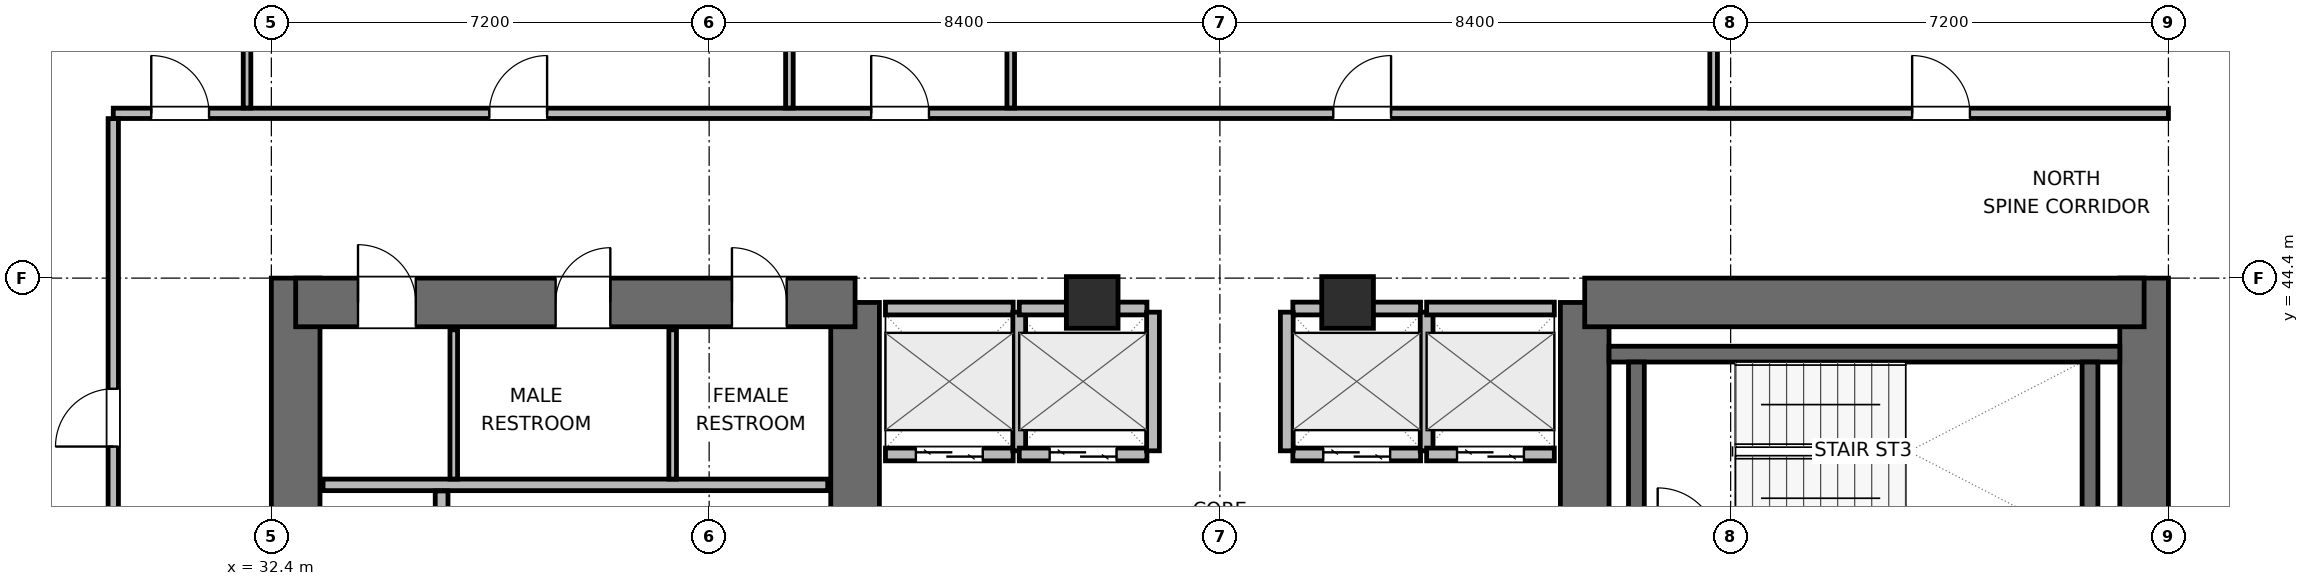
"""IFC4 building model, lengths in metres.
Left out: names, types, materials, properties, quantities, classifications, styles, units other than length and angle.
Written with IfcOpenShell. Run it as: python <this file> out.ifc"""

import sys

from ifc_helpers import new_model, si_unit, direction, frame, frame_2d, origin, origin_2d, place, context, subcontext, project, spatial, rectangle, extrude, element, fill, save


model = new_model("IFC4")
c1 = context("Model", 3, precision=1e-05, world=origin(), true_north=direction((0.0, 1.0)))
c2 = subcontext(c1, "Body", "Model", "MODEL_VIEW")
j1 = project(units=[si_unit("LENGTHUNIT", "METRE"), si_unit("PLANEANGLEUNIT", "RADIAN")], contexts=[c1])
p1 = place(None, origin())
s1 = spatial("IfcSite", under=j1, at=p1, CompositionType="ELEMENT")
p2 = place(p1, origin())
s2 = spatial("IfcBuilding", under=s1, at=p2, CompositionType="ELEMENT")
p3 = place(p2, frame((0.0, 0.0, 170.1)))
s3 = spatial("IfcBuildingStorey", under=s2, at=p3, CompositionType="ELEMENT", Elevation=170.1)
p4 = place(p3, frame((32.8, 27.6, 0.0), z_axis=(0.0, 0.0, 1.0), x_axis=(0.0, 1.0, 0.0)))
e1 = element("IfcWall", 1, at=p4, inside=s3, PredefinedType="SHEAR", context=c2, shape_type="SweptSolid", body=[
    extrude(rectangle(XDim=16.8, YDim=0.8, at=frame_2d((8.4, 0.0))), origin(), (0.0, 0.0, 1.0), 3.9),
])
p5 = place(p3, frame((42.0, 37.8, 0.0), z_axis=(0.0, 0.0, 1.0), x_axis=(0.0, 1.0, 0.0)))
e2 = element("IfcWall", 2, at=p5, inside=s3, PredefinedType="SHEAR", context=c2, shape_type="SweptSolid", body=[
    extrude(rectangle(XDim=6.2, YDim=0.8, at=frame_2d((3.1, 0.0))), origin(), (0.0, 0.0, 1.0), 3.9),
])
p6 = place(p3, frame((32.8, 44.0, 0.0), z_axis=(0.0, 0.0, 1.0), x_axis=(1.0, 0.0, 0.0)))
e3 = element("IfcWall", 3, at=p6, inside=s3, PredefinedType="SHEAR", context=c2, shape_type="SweptSolid", body=[
    extrude(rectangle(XDim=9.2, YDim=0.8, at=frame_2d((4.6, 0.0))), origin(), (0.0, 0.0, 1.0), 3.9),
])
p7 = place(p6, frame((1.025, 0.0, 0.0)))
e4 = element("IfcOpeningElement", 4, at=p7, cuts=e3, PredefinedType="OPENING", context=c2, shape_type="SweptSolid", body=[
    extrude(rectangle(XDim=0.95, YDim=2.04, at=frame_2d((0.475, 1.02))), frame((0.0, 0.41, 0.0), z_axis=(0.0, -1.0, 0.0), x_axis=(1.0, 0.0, 0.0)), (0.0, 0.0, 1.0), 0.82),
])
p8 = place(p6, frame((4.275, 0.0, 0.0)))
e5 = element("IfcOpeningElement", 5, at=p8, cuts=e3, PredefinedType="OPENING", context=c2, shape_type="SweptSolid", body=[
    extrude(rectangle(XDim=0.9, YDim=2.02, at=frame_2d((0.45, 1.01))), frame((0.0, 0.41, 0.0), z_axis=(0.0, -1.0, 0.0), x_axis=(1.0, 0.0, 0.0)), (0.0, 0.0, 1.0), 0.82),
])
p9 = place(p6, frame((7.175, 0.0, 0.0)))
e6 = element("IfcOpeningElement", 6, at=p9, cuts=e3, PredefinedType="OPENING", context=c2, shape_type="SweptSolid", body=[
    extrude(rectangle(XDim=0.9, YDim=2.02, at=frame_2d((0.45, 1.01))), frame((0.0, 0.41, 0.0), z_axis=(0.0, -1.0, 0.0), x_axis=(1.0, 0.0, 0.0)), (0.0, 0.0, 1.0), 0.82),
])
p10 = place(p3, frame((54.0, 38.0, 0.0), z_axis=(0.0, 0.0, 1.0), x_axis=(0.0, 1.0, 0.0)))
e7 = element("IfcWall", 7, at=p10, inside=s3, PredefinedType="SHEAR", context=c2, shape_type="SweptSolid", body=[
    extrude(rectangle(XDim=6.0, YDim=0.8, at=frame_2d((3.0, 0.0))), origin(), (0.0, 0.0, 1.0), 3.9),
])
p11 = place(p3, frame((63.2, 27.6, 0.0), z_axis=(0.0, 0.0, 1.0), x_axis=(0.0, 1.0, 0.0)))
e8 = element("IfcWall", 8, at=p11, inside=s3, PredefinedType="SHEAR", context=c2, shape_type="SweptSolid", body=[
    extrude(rectangle(XDim=16.8, YDim=0.8, at=frame_2d((8.4, 0.0))), origin(), (0.0, 0.0, 1.0), 3.9),
])
p12 = place(p3, frame((54.0, 44.0, 0.0), z_axis=(0.0, 0.0, 1.0), x_axis=(1.0, 0.0, 0.0)))
e9 = element("IfcWall", 9, at=p12, inside=s3, PredefinedType="SHEAR", context=c2, shape_type="SweptSolid", body=[
    extrude(rectangle(XDim=9.2, YDim=0.8, at=frame_2d((4.6, 0.0))), origin(), (0.0, 0.0, 1.0), 3.9),
])
p13 = place(p3, frame((54.4, 43.15, 0.0), z_axis=(0.0, 0.0, 1.0), x_axis=(1.0, 0.0, 0.0)))
e10 = element("IfcWall", 10, at=p13, inside=s3, PredefinedType="SHEAR", context=c2, shape_type="SweptSolid", body=[
    extrude(rectangle(XDim=8.4, YDim=0.26, at=frame_2d((4.2, 0.0))), origin(), (0.0, 0.0, 1.0), 3.9),
])
for number, where, z_axis, x_axis in (
    (11, (54.85, 40.08, 0.0), (0.0, 0.0, 1.0), (0.0, 1.0, 0.0)),
    (12, (62.31, 40.08, 0.0), (0.0, 0.0, 1.0), (0.0, 1.0, 0.0)),
):
    element("IfcWall", number, at=place(p3, frame(where, z_axis=z_axis, x_axis=x_axis)), inside=s3, PredefinedType="SHEAR", context=c2, shape_type="SweptSolid", body=[
        extrude(rectangle(XDim=2.94, YDim=0.26, at=frame_2d((1.47, 0.0))), origin(), (0.0, 0.0, 1.0), 3.9),
    ])
for number, where, z_axis, x_axis in (
    (13, (45.9, 44.0, 0.0), (0.0, 0.0, 1.0), (1.0, 0.0, 0.0)),
    (14, (50.1, 44.0, 0.0), (0.0, 0.0, 1.0), (1.0, 0.0, 0.0)),
):
    element("IfcColumn", number, at=place(p3, frame(where, z_axis=z_axis, x_axis=x_axis)), inside=s3, PredefinedType="COLUMN", context=c2, shape_type="SweptSolid", body=[
        extrude(rectangle(XDim=0.85, YDim=0.85, at=origin_2d()), origin(), (0.0, 0.0, 1.0), 3.9),
    ])
p14 = place(p3, frame((33.25, 41.0, 0.0), z_axis=(0.0, 0.0, 1.0), x_axis=(1.0, 0.0, 0.0)))
e15 = element("IfcWall", 15, at=p14, inside=s3, PredefinedType="PLUMBINGWALL", context=c2, shape_type="SweptSolid", body=[
    extrude(rectangle(XDim=8.3, YDim=0.19, at=frame_2d((4.15, 0.0))), origin(), (0.0, 0.0, 1.0), 3.68),
])
for number, where, z_axis, x_axis in (
    (16, (35.4, 41.095, 0.0), (0.0, 0.0, 1.0), (0.0, 1.0, 0.0)),
    (17, (39.0, 41.095, 0.0), (0.0, 0.0, 1.0), (0.0, 1.0, 0.0)),
):
    element("IfcWall", number, at=place(p3, frame(where, z_axis=z_axis, x_axis=x_axis)), inside=s3, PredefinedType="PARTITIONING", context=c2, shape_type="SweptSolid", body=[
        extrude(rectangle(XDim=2.455, YDim=0.125, at=frame_2d((1.228, 0.0))), origin(), (0.0, 0.0, 1.0), 3.68),
    ])
p15 = place(p3, frame((35.2, 39.58, 0.0), z_axis=(0.0, 0.0, 1.0), x_axis=(0.0, 1.0, 0.0)))
e18 = element("IfcWall", 18, at=p15, inside=s3, PredefinedType="PARTITIONING", context=c2, shape_type="SweptSolid", body=[
    extrude(rectangle(XDim=1.32, YDim=0.21, at=frame_2d((0.66, 0.0))), origin(), (0.0, 0.0, 1.0), 3.68),
])
p16 = place(p3, frame((42.5, 41.5, 0.0), z_axis=(0.0, 0.0, 1.0), x_axis=(1.0, 0.0, 0.0)))
e19 = element("IfcWall", 19, at=p16, inside=s3, PredefinedType="PARTITIONING", context=c2, shape_type="SweptSolid", body=[
    extrude(rectangle(XDim=2.1, YDim=0.21, at=frame_2d((1.05, 0.0))), origin(), (0.0, 0.0, 1.0), 3.68),
])
p17 = place(p16, frame((0.5, 0.0, 0.0)))
e20 = element("IfcOpeningElement", 20, at=p17, cuts=e19, PredefinedType="OPENING", context=c2, shape_type="SweptSolid", body=[
    extrude(rectangle(XDim=1.1, YDim=2.04, at=frame_2d((0.55, 1.02))), frame((0.0, 0.115, 0.0), z_axis=(0.0, -1.0, 0.0), x_axis=(1.0, 0.0, 0.0)), (0.0, 0.0, 1.0), 0.23),
])
p18 = place(p3, frame((42.5, 43.9, 0.0), z_axis=(0.0, 0.0, 1.0), x_axis=(1.0, 0.0, 0.0)))
e21 = element("IfcWall", 21, at=p18, inside=s3, PredefinedType="PARTITIONING", context=c2, shape_type="SweptSolid", body=[
    extrude(rectangle(XDim=2.1, YDim=0.21, at=frame_2d((1.05, 0.0))), origin(), (0.0, 0.0, 1.0), 2.765),
])
p19 = place(p3, frame((44.7, 41.56, 0.0), z_axis=(0.0, 0.0, 1.0), x_axis=(0.0, 1.0, 0.0)))
e22 = element("IfcWall", 22, at=p19, inside=s3, PredefinedType="PARTITIONING", context=c2, shape_type="SweptSolid", body=[
    extrude(rectangle(XDim=2.28, YDim=0.21, at=frame_2d((1.14, 0.0))), origin(), (0.0, 0.0, 1.0), 3.68),
])
p20 = place(p3, frame((44.7, 41.5, 0.0), z_axis=(0.0, 0.0, 1.0), x_axis=(1.0, 0.0, 0.0)))
e23 = element("IfcWall", 23, at=p20, inside=s3, PredefinedType="PARTITIONING", context=c2, shape_type="SweptSolid", body=[
    extrude(rectangle(XDim=2.1, YDim=0.21, at=frame_2d((1.05, 0.0))), origin(), (0.0, 0.0, 1.0), 3.68),
])
p21 = place(p20, frame((0.5, 0.0, 0.0)))
e24 = element("IfcOpeningElement", 24, at=p21, cuts=e23, PredefinedType="OPENING", context=c2, shape_type="SweptSolid", body=[
    extrude(rectangle(XDim=1.1, YDim=2.04, at=frame_2d((0.55, 1.02))), frame((0.0, 0.115, 0.0), z_axis=(0.0, -1.0, 0.0), x_axis=(1.0, 0.0, 0.0)), (0.0, 0.0, 1.0), 0.23),
])
p22 = place(p3, frame((44.7, 43.9, 0.0), z_axis=(0.0, 0.0, 1.0), x_axis=(1.0, 0.0, 0.0)))
e25 = element("IfcWall", 25, at=p22, inside=s3, PredefinedType="PARTITIONING", context=c2, shape_type="SweptSolid", body=[
    extrude(rectangle(XDim=2.1, YDim=0.21, at=frame_2d((1.05, 0.0))), origin(), (0.0, 0.0, 1.0), 2.765),
])
p23 = place(p3, frame((46.9, 41.56, 0.0), z_axis=(0.0, 0.0, 1.0), x_axis=(0.0, 1.0, 0.0)))
e26 = element("IfcWall", 26, at=p23, inside=s3, PredefinedType="PARTITIONING", context=c2, shape_type="SweptSolid", body=[
    extrude(rectangle(XDim=2.28, YDim=0.21, at=frame_2d((1.14, 0.0))), origin(), (0.0, 0.0, 1.0), 3.68),
])
p24 = place(p3, frame((49.2, 41.5, 0.0), z_axis=(0.0, 0.0, 1.0), x_axis=(1.0, 0.0, 0.0)))
e27 = element("IfcWall", 27, at=p24, inside=s3, PredefinedType="PARTITIONING", context=c2, shape_type="SweptSolid", body=[
    extrude(rectangle(XDim=2.1, YDim=0.21, at=frame_2d((1.05, 0.0))), origin(), (0.0, 0.0, 1.0), 3.68),
])
p25 = place(p24, frame((0.5, 0.0, 0.0)))
e28 = element("IfcOpeningElement", 28, at=p25, cuts=e27, PredefinedType="OPENING", context=c2, shape_type="SweptSolid", body=[
    extrude(rectangle(XDim=1.1, YDim=2.04, at=frame_2d((0.55, 1.02))), frame((0.0, 0.115, 0.0), z_axis=(0.0, -1.0, 0.0), x_axis=(1.0, 0.0, 0.0)), (0.0, 0.0, 1.0), 0.23),
])
p26 = place(p3, frame((49.2, 43.9, 0.0), z_axis=(0.0, 0.0, 1.0), x_axis=(1.0, 0.0, 0.0)))
e29 = element("IfcWall", 29, at=p26, inside=s3, PredefinedType="PARTITIONING", context=c2, shape_type="SweptSolid", body=[
    extrude(rectangle(XDim=2.1, YDim=0.21, at=frame_2d((1.05, 0.0))), origin(), (0.0, 0.0, 1.0), 2.765),
])
for number, where, z_axis, x_axis in (
    (30, (49.1, 41.56, 0.0), (0.0, 0.0, 1.0), (0.0, 1.0, 0.0)),
    (31, (51.4, 41.56, 0.0), (0.0, 0.0, 1.0), (0.0, 1.0, 0.0)),
):
    element("IfcWall", number, at=place(p3, frame(where, z_axis=z_axis, x_axis=x_axis)), inside=s3, PredefinedType="PARTITIONING", context=c2, shape_type="SweptSolid", body=[
        extrude(rectangle(XDim=2.28, YDim=0.21, at=frame_2d((1.14, 0.0))), origin(), (0.0, 0.0, 1.0), 3.68),
    ])
p27 = place(p3, frame((51.4, 41.5, 0.0), z_axis=(0.0, 0.0, 1.0), x_axis=(1.0, 0.0, 0.0)))
e32 = element("IfcWall", 32, at=p27, inside=s3, PredefinedType="PARTITIONING", context=c2, shape_type="SweptSolid", body=[
    extrude(rectangle(XDim=2.1, YDim=0.21, at=frame_2d((1.05, 0.0))), origin(), (0.0, 0.0, 1.0), 3.68),
])
p28 = place(p27, frame((0.5, 0.0, 0.0)))
e33 = element("IfcOpeningElement", 33, at=p28, cuts=e32, PredefinedType="OPENING", context=c2, shape_type="SweptSolid", body=[
    extrude(rectangle(XDim=1.1, YDim=2.04, at=frame_2d((0.55, 1.02))), frame((0.0, 0.115, 0.0), z_axis=(0.0, -1.0, 0.0), x_axis=(1.0, 0.0, 0.0)), (0.0, 0.0, 1.0), 0.23),
])
p29 = place(p3, frame((51.4, 43.9, 0.0), z_axis=(0.0, 0.0, 1.0), x_axis=(1.0, 0.0, 0.0)))
e34 = element("IfcWall", 34, at=p29, inside=s3, PredefinedType="PARTITIONING", context=c2, shape_type="SweptSolid", body=[
    extrude(rectangle(XDim=2.1, YDim=0.21, at=frame_2d((1.05, 0.0))), origin(), (0.0, 0.0, 1.0), 2.765),
])
p30 = place(p3, frame((29.8, 47.11, 0.0), z_axis=(0.0, 0.0, 1.0), x_axis=(1.0, 0.0, 0.0)))
e35 = element("IfcWall", 35, at=p30, inside=s3, PredefinedType="PARTITIONING", context=c2, shape_type="SweptSolid", body=[
    extrude(rectangle(XDim=33.8, YDim=0.17, at=frame_2d((16.9, 0.0))), origin(), (0.0, 0.0, 1.0), 3.68),
])
p31 = place(p30, frame((0.625, 0.0, 0.0)))
e36 = element("IfcOpeningElement", 36, at=p31, cuts=e35, PredefinedType="OPENING", context=c2, shape_type="SweptSolid", body=[
    extrude(rectangle(XDim=0.95, YDim=2.04, at=frame_2d((0.475, 1.02))), frame((0.0, 0.095, 0.0), z_axis=(0.0, -1.0, 0.0), x_axis=(1.0, 0.0, 0.0)), (0.0, 0.0, 1.0), 0.19),
])
p32 = place(p30, frame((6.185, 0.0, 0.0)))
e37 = element("IfcOpeningElement", 37, at=p32, cuts=e35, PredefinedType="OPENING", context=c2, shape_type="SweptSolid", body=[
    extrude(rectangle(XDim=0.95, YDim=2.04, at=frame_2d((0.475, 1.02))), frame((0.0, 0.095, 0.0), z_axis=(0.0, -1.0, 0.0), x_axis=(1.0, 0.0, 0.0)), (0.0, 0.0, 1.0), 0.19),
])
p33 = place(p30, frame((12.465, 0.0, 0.0)))
e38 = element("IfcOpeningElement", 38, at=p33, cuts=e35, PredefinedType="OPENING", context=c2, shape_type="SweptSolid", body=[
    extrude(rectangle(XDim=0.95, YDim=2.04, at=frame_2d((0.475, 1.02))), frame((0.0, 0.095, 0.0), z_axis=(0.0, -1.0, 0.0), x_axis=(1.0, 0.0, 0.0)), (0.0, 0.0, 1.0), 0.19),
])
p34 = place(p30, frame((20.065, 0.0, 0.0)))
e39 = element("IfcOpeningElement", 39, at=p34, cuts=e35, PredefinedType="OPENING", context=c2, shape_type="SweptSolid", body=[
    extrude(rectangle(XDim=0.95, YDim=2.04, at=frame_2d((0.475, 1.02))), frame((0.0, 0.095, 0.0), z_axis=(0.0, -1.0, 0.0), x_axis=(1.0, 0.0, 0.0)), (0.0, 0.0, 1.0), 0.19),
])
p35 = place(p30, frame((29.585, 0.0, 0.0)))
e40 = element("IfcOpeningElement", 40, at=p35, cuts=e35, PredefinedType="OPENING", context=c2, shape_type="SweptSolid", body=[
    extrude(rectangle(XDim=0.95, YDim=2.04, at=frame_2d((0.475, 1.02))), frame((0.0, 0.095, 0.0), z_axis=(0.0, -1.0, 0.0), x_axis=(1.0, 0.0, 0.0)), (0.0, 0.0, 1.0), 0.19),
])
p36 = place(p3, frame((29.8, 37.1, 0.0), z_axis=(0.0, 0.0, 1.0), x_axis=(0.0, 1.0, 0.0)))
e41 = element("IfcWall", 41, at=p36, inside=s3, PredefinedType="PARTITIONING", context=c2, shape_type="SweptSolid", body=[
    extrude(rectangle(XDim=9.923, YDim=0.17, at=frame_2d((4.961, 0.0))), origin(), (0.0, 0.0, 1.0), 3.68),
])
p37 = place(p36, frame((4.53, 0.0, 0.0)))
e42 = element("IfcOpeningElement", 42, at=p37, cuts=e41, PredefinedType="OPENING", context=c2, shape_type="SweptSolid", body=[
    extrude(rectangle(XDim=0.95, YDim=2.04, at=frame_2d((0.475, 1.02))), frame((0.0, 0.095, 0.0), z_axis=(0.0, -1.0, 0.0), x_axis=(1.0, 0.0, 0.0)), (0.0, 0.0, 1.0), 0.19),
])
p38 = place(p3, frame((32.0, 47.197, 0.0), z_axis=(0.0, 0.0, 1.0), x_axis=(0.0, 1.0, 0.0)))
e43 = element("IfcWall", 43, at=p38, inside=s3, PredefinedType="PARTITIONING", context=c2, shape_type="SweptSolid", body=[
    extrude(rectangle(XDim=14.968, YDim=0.125, at=frame_2d((7.484, 0.0))), origin(), (0.0, 0.0, 1.0), 3.68),
])
p39 = place(p3, frame((40.92, 47.197, 0.0), z_axis=(0.0, 0.0, 1.0), x_axis=(0.0, 1.0, 0.0)))
e44 = element("IfcWall", 44, at=p39, inside=s3, PredefinedType="PARTITIONING", context=c2, shape_type="SweptSolid", body=[
    extrude(rectangle(XDim=14.968, YDim=0.125, at=frame_2d((7.484, 0.0))), origin(), (0.0, 0.0, 1.0), 3.043),
])
p40 = place(p3, frame((44.56, 47.197, 0.0), z_axis=(0.0, 0.0, 1.0), x_axis=(0.0, 1.0, 0.0)))
e45 = element("IfcWall", 45, at=p40, inside=s3, PredefinedType="PARTITIONING", context=c2, shape_type="SweptSolid", body=[
    extrude(rectangle(XDim=13.328, YDim=0.125, at=frame_2d((6.664, 0.0))), origin(), (0.0, 0.0, 1.0), 3.043),
])
p41 = place(p3, frame((56.12, 47.197, 0.0), z_axis=(0.0, 0.0, 1.0), x_axis=(0.0, 1.0, 0.0)))
e46 = element("IfcWall", 46, at=p41, inside=s3, PredefinedType="PARTITIONING", context=c2, shape_type="SweptSolid", body=[
    extrude(rectangle(XDim=14.928, YDim=0.125, at=frame_2d((7.464, 0.0))), origin(), (0.0, 0.0, 1.0), 3.043),
])
p42 = place(p17, origin())
e47 = element("IfcDoor", 47, at=p42, inside=s3, OperationType="DOUBLE_DOOR_SLIDING", PredefinedType="DOOR", context=c2, shape_type="SweptSolid", body=[
    extrude(rectangle(XDim=1.1, YDim=2.04, at=frame_2d((0.55, 1.02))), frame((0.0, 0.025, 0.0), z_axis=(0.0, -1.0, 0.0), x_axis=(1.0, 0.0, 0.0)), (0.0, 0.0, 1.0), 0.05),
])
fill(e20, e47)
p43 = place(p21, origin())
e48 = element("IfcDoor", 48, at=p43, inside=s3, OperationType="DOUBLE_DOOR_SLIDING", PredefinedType="DOOR", context=c2, shape_type="SweptSolid", body=[
    extrude(rectangle(XDim=1.1, YDim=2.04, at=frame_2d((0.55, 1.02))), frame((0.0, 0.025, 0.0), z_axis=(0.0, -1.0, 0.0), x_axis=(1.0, 0.0, 0.0)), (0.0, 0.0, 1.0), 0.05),
])
fill(e24, e48)
p44 = place(p25, origin())
e49 = element("IfcDoor", 49, at=p44, inside=s3, OperationType="DOUBLE_DOOR_SLIDING", PredefinedType="DOOR", context=c2, shape_type="SweptSolid", body=[
    extrude(rectangle(XDim=1.1, YDim=2.04, at=frame_2d((0.55, 1.02))), frame((0.0, 0.025, 0.0), z_axis=(0.0, -1.0, 0.0), x_axis=(1.0, 0.0, 0.0)), (0.0, 0.0, 1.0), 0.05),
])
fill(e28, e49)
p45 = place(p28, origin())
e50 = element("IfcDoor", 50, at=p45, inside=s3, OperationType="DOUBLE_DOOR_SLIDING", PredefinedType="DOOR", context=c2, shape_type="SweptSolid", body=[
    extrude(rectangle(XDim=1.1, YDim=2.04, at=frame_2d((0.55, 1.02))), frame((0.0, 0.025, 0.0), z_axis=(0.0, -1.0, 0.0), x_axis=(1.0, 0.0, 0.0)), (0.0, 0.0, 1.0), 0.05),
])
fill(e33, e50)
p46 = place(p7, origin())
e51 = element("IfcDoor", 51, at=p46, inside=s3, OperationType="SINGLE_SWING_LEFT", PredefinedType="DOOR", context=c2, shape_type="SweptSolid", body=[
    extrude(rectangle(XDim=0.95, YDim=2.04, at=frame_2d((0.475, 1.02))), frame((0.0, 0.025, 0.0), z_axis=(0.0, -1.0, 0.0), x_axis=(1.0, 0.0, 0.0)), (0.0, 0.0, 1.0), 0.05),
])
fill(e4, e51)
p47 = place(p8, origin())
e52 = element("IfcDoor", 52, at=p47, inside=s3, OperationType="SINGLE_SWING_RIGHT", PredefinedType="DOOR", context=c2, shape_type="SweptSolid", body=[
    extrude(rectangle(XDim=0.9, YDim=2.02, at=frame_2d((0.45, 1.01))), frame((0.0, 0.025, 0.0), z_axis=(0.0, -1.0, 0.0), x_axis=(1.0, 0.0, 0.0)), (0.0, 0.0, 1.0), 0.05),
])
fill(e5, e52)
p48 = place(p9, origin())
e53 = element("IfcDoor", 53, at=p48, inside=s3, OperationType="SINGLE_SWING_LEFT", PredefinedType="DOOR", context=c2, shape_type="SweptSolid", body=[
    extrude(rectangle(XDim=0.9, YDim=2.02, at=frame_2d((0.45, 1.01))), frame((0.0, 0.025, 0.0), z_axis=(0.0, -1.0, 0.0), x_axis=(1.0, 0.0, 0.0)), (0.0, 0.0, 1.0), 0.05),
])
fill(e6, e53)
p49 = place(p31, origin())
e54 = element("IfcDoor", 54, at=p49, inside=s3, OperationType="SINGLE_SWING_LEFT", PredefinedType="DOOR", context=c2, shape_type="SweptSolid", body=[
    extrude(rectangle(XDim=0.95, YDim=2.04, at=frame_2d((0.475, 1.02))), frame((0.0, 0.025, 0.0), z_axis=(0.0, -1.0, 0.0), x_axis=(1.0, 0.0, 0.0)), (0.0, 0.0, 1.0), 0.05),
])
fill(e36, e54)
p50 = place(p32, origin())
e55 = element("IfcDoor", 55, at=p50, inside=s3, OperationType="SINGLE_SWING_RIGHT", PredefinedType="DOOR", context=c2, shape_type="SweptSolid", body=[
    extrude(rectangle(XDim=0.95, YDim=2.04, at=frame_2d((0.475, 1.02))), frame((0.0, 0.025, 0.0), z_axis=(0.0, -1.0, 0.0), x_axis=(1.0, 0.0, 0.0)), (0.0, 0.0, 1.0), 0.05),
])
fill(e37, e55)
p51 = place(p33, origin())
e56 = element("IfcDoor", 56, at=p51, inside=s3, OperationType="SINGLE_SWING_LEFT", PredefinedType="DOOR", context=c2, shape_type="SweptSolid", body=[
    extrude(rectangle(XDim=0.95, YDim=2.04, at=frame_2d((0.475, 1.02))), frame((0.0, 0.025, 0.0), z_axis=(0.0, -1.0, 0.0), x_axis=(1.0, 0.0, 0.0)), (0.0, 0.0, 1.0), 0.05),
])
fill(e38, e56)
p52 = place(p34, origin())
e57 = element("IfcDoor", 57, at=p52, inside=s3, OperationType="SINGLE_SWING_RIGHT", PredefinedType="DOOR", context=c2, shape_type="SweptSolid", body=[
    extrude(rectangle(XDim=0.95, YDim=2.04, at=frame_2d((0.475, 1.02))), frame((0.0, 0.025, 0.0), z_axis=(0.0, -1.0, 0.0), x_axis=(1.0, 0.0, 0.0)), (0.0, 0.0, 1.0), 0.05),
])
fill(e39, e57)
p53 = place(p35, origin())
e58 = element("IfcDoor", 58, at=p53, inside=s3, OperationType="SINGLE_SWING_LEFT", PredefinedType="DOOR", context=c2, shape_type="SweptSolid", body=[
    extrude(rectangle(XDim=0.95, YDim=2.04, at=frame_2d((0.475, 1.02))), frame((0.0, 0.025, 0.0), z_axis=(0.0, -1.0, 0.0), x_axis=(1.0, 0.0, 0.0)), (0.0, 0.0, 1.0), 0.05),
])
fill(e40, e58)
p54 = place(p37, origin())
e59 = element("IfcDoor", 59, at=p54, inside=s3, OperationType="SINGLE_SWING_LEFT", PredefinedType="DOOR", context=c2, shape_type="SweptSolid", body=[
    extrude(rectangle(XDim=0.95, YDim=2.04, at=frame_2d((0.475, 1.02))), frame((0.0, 0.025, 0.0), z_axis=(0.0, -1.0, 0.0), x_axis=(1.0, 0.0, 0.0)), (0.0, 0.0, 1.0), 0.05),
])
fill(e42, e59)
save(model, sys.argv[1])
